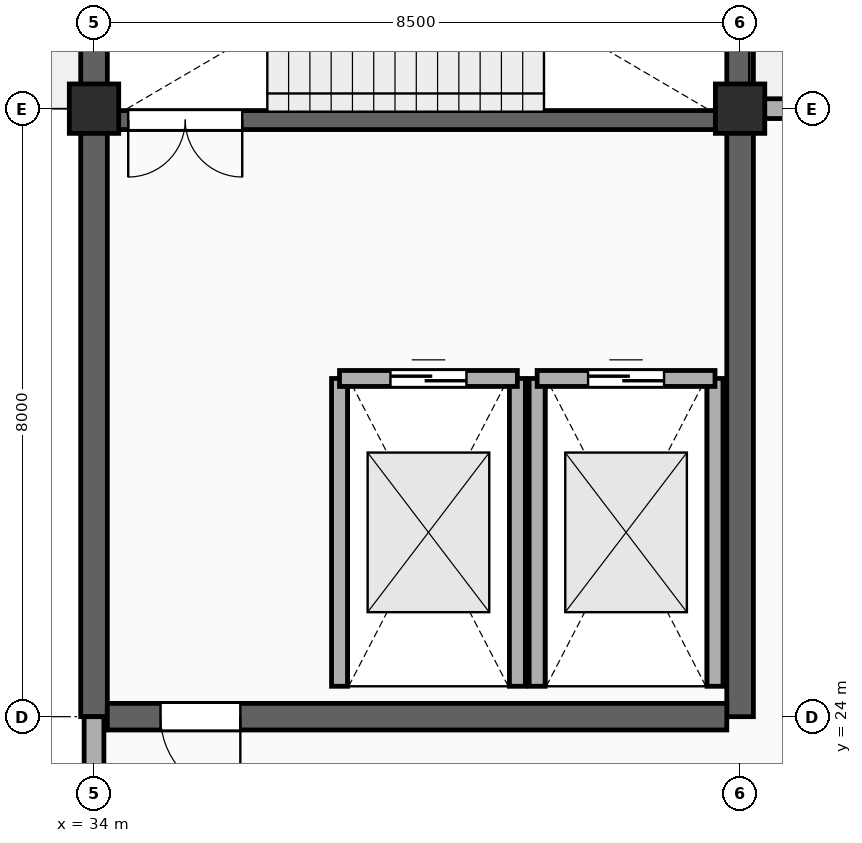
"""IFC4 building model, lengths in metres.
Left out: names, types, materials, properties, quantities, classifications, styles, units other than length and angle.
Written with IfcOpenShell. Run it as: python <this file> out.ifc"""

import sys

from ifc_helpers import new_model, si_unit, direction, frame, frame_2d, origin, origin_2d, place, context, subcontext, project, spatial, rectangle, extrude, element, fill, save


model = new_model("IFC4")
c1 = context("Model", 3, precision=1e-05, world=origin(), true_north=direction((0.0, 1.0)))
c2 = subcontext(c1, "Body", "Model", "MODEL_VIEW")
j1 = project(units=[si_unit("LENGTHUNIT", "METRE"), si_unit("PLANEANGLEUNIT", "RADIAN")], contexts=[c1])
p1 = place(None, origin())
s1 = spatial("IfcSite", under=j1, at=p1, CompositionType="ELEMENT")
p2 = place(p1, origin())
s2 = spatial("IfcBuilding", under=s1, at=p2, CompositionType="ELEMENT")
p3 = place(p2, frame((0.0, 0.0, 19.8)))
s3 = spatial("IfcBuildingStorey", under=s2, at=p3, CompositionType="ELEMENT", Elevation=19.8)
for number, where, z_axis, x_axis in (
    (1, (34.0, 24.0, 0.0), (0.0, 0.0, 1.0), (0.0, 1.0, 0.0)),
    (2, (42.5, 24.0, 0.0), (0.0, 0.0, 1.0), (0.0, 1.0, 0.0)),
):
    element("IfcWall", number, at=place(p3, frame(where, z_axis=z_axis, x_axis=x_axis)), inside=s3, PredefinedType="SHEAR", context=c2, shape_type="SweptSolid", body=[
        extrude(rectangle(XDim=12.8, YDim=0.35, at=frame_2d((6.4, 0.0))), origin(), (0.0, 0.0, 1.0), 4.64),
    ])
p4 = place(p3, frame((34.175, 24.0, 0.0), z_axis=(0.0, 0.0, 1.0), x_axis=(1.0, 0.0, 0.0)))
e3 = element("IfcWall", 3, at=p4, inside=s3, PredefinedType="SHEAR", context=c2, shape_type="SweptSolid", body=[
    extrude(rectangle(XDim=8.15, YDim=0.35, at=frame_2d((4.075, 0.0))), origin(), (0.0, 0.0, 1.0), 4.64),
])
p5 = place(p4, frame((0.7, 0.0, 0.0)))
e4 = element("IfcOpeningElement", 4, at=p5, cuts=e3, PredefinedType="OPENING", context=c2, shape_type="SweptSolid", body=[
    extrude(rectangle(XDim=1.05, YDim=2.15, at=frame_2d((0.525, 1.075))), frame((0.0, 0.187, 0.0), z_axis=(0.0, -1.0, 0.0), x_axis=(1.0, 0.0, 0.0)), (0.0, 0.0, 1.0), 0.374),
])
p6 = place(p3, frame((34.25, 31.85, 0.0), z_axis=(0.0, 0.0, 1.0), x_axis=(1.0, 0.0, 0.0)))
e5 = element("IfcWall", 5, at=p6, inside=s3, PredefinedType="STANDARD", context=c2, shape_type="SweptSolid", body=[
    extrude(rectangle(XDim=8.0, YDim=0.25, at=frame_2d((4.0, 0.0))), origin(), (0.0, 0.0, 1.0), 4.64),
])
p7 = place(p6, frame((0.2, 0.0, 0.0)))
e6 = element("IfcOpeningElement", 6, at=p7, cuts=e5, PredefinedType="OPENING", context=c2, shape_type="SweptSolid", body=[
    extrude(rectangle(XDim=1.5, YDim=2.2, at=frame_2d((0.75, 1.1))), frame((0.0, 0.137, 0.0), z_axis=(0.0, -1.0, 0.0), x_axis=(1.0, 0.0, 0.0)), (0.0, 0.0, 1.0), 0.274),
])
for number, where, z_axis, x_axis in (
    (7, (37.23, 24.4, 0.0), (0.0, 0.0, 1.0), (0.0, 1.0, 0.0)),
    (8, (39.57, 24.4, 0.0), (0.0, 0.0, 1.0), (0.0, 1.0, 0.0)),
):
    element("IfcWall", number, at=place(p3, frame(where, z_axis=z_axis, x_axis=x_axis)), inside=s3, PredefinedType="PARTITIONING", context=c2, shape_type="SweptSolid", body=[
        extrude(rectangle(XDim=4.05, YDim=0.21, at=frame_2d((2.025, 0.0))), origin(), (0.0, 0.0, 1.0), 4.64),
    ])
p8 = place(p3, frame((37.23, 28.45, 0.0), z_axis=(0.0, 0.0, 1.0), x_axis=(1.0, 0.0, 0.0)))
e9 = element("IfcWall", 9, at=p8, inside=s3, PredefinedType="PARTITIONING", context=c2, shape_type="SweptSolid", body=[
    extrude(rectangle(XDim=2.34, YDim=0.21, at=frame_2d((1.17, 0.0))), origin(), (0.0, 0.0, 1.0), 4.64),
])
p9 = place(p8, frame((0.67, 0.0, 0.0)))
e10 = element("IfcOpeningElement", 10, at=p9, cuts=e9, PredefinedType="OPENING", context=c2, shape_type="SweptSolid", body=[
    extrude(rectangle(XDim=1.0, YDim=2.2, at=frame_2d((0.5, 1.1))), frame((0.0, 0.117, 0.0), z_axis=(0.0, -1.0, 0.0), x_axis=(1.0, 0.0, 0.0)), (0.0, 0.0, 1.0), 0.234),
])
for number, where, z_axis, x_axis in (
    (11, (39.83, 24.4, 0.0), (0.0, 0.0, 1.0), (0.0, 1.0, 0.0)),
    (12, (42.17, 24.4, 0.0), (0.0, 0.0, 1.0), (0.0, 1.0, 0.0)),
):
    element("IfcWall", number, at=place(p3, frame(where, z_axis=z_axis, x_axis=x_axis)), inside=s3, PredefinedType="PARTITIONING", context=c2, shape_type="SweptSolid", body=[
        extrude(rectangle(XDim=4.05, YDim=0.21, at=frame_2d((2.025, 0.0))), origin(), (0.0, 0.0, 1.0), 4.64),
    ])
p10 = place(p3, frame((39.83, 28.45, 0.0), z_axis=(0.0, 0.0, 1.0), x_axis=(1.0, 0.0, 0.0)))
e13 = element("IfcWall", 13, at=p10, inside=s3, PredefinedType="PARTITIONING", context=c2, shape_type="SweptSolid", body=[
    extrude(rectangle(XDim=2.34, YDim=0.21, at=frame_2d((1.17, 0.0))), origin(), (0.0, 0.0, 1.0), 4.64),
])
p11 = place(p10, frame((0.67, 0.0, 0.0)))
e14 = element("IfcOpeningElement", 14, at=p11, cuts=e13, PredefinedType="OPENING", context=c2, shape_type="SweptSolid", body=[
    extrude(rectangle(XDim=1.0, YDim=2.2, at=frame_2d((0.5, 1.1))), frame((0.0, 0.117, 0.0), z_axis=(0.0, -1.0, 0.0), x_axis=(1.0, 0.0, 0.0)), (0.0, 0.0, 1.0), 0.234),
])
for number, where, z_axis, x_axis in (
    (15, (34.0, 32.0, 0.0), (0.0, 0.0, 1.0), (1.0, 0.0, 0.0)),
    (16, (42.5, 32.0, 0.0), (0.0, 0.0, 1.0), (1.0, 0.0, 0.0)),
):
    element("IfcColumn", number, at=place(p3, frame(where, z_axis=z_axis, x_axis=x_axis)), inside=s3, PredefinedType="COLUMN", context=c2, shape_type="SweptSolid", body=[
        extrude(rectangle(XDim=0.65, YDim=0.65, at=origin_2d()), origin(), (0.0, 0.0, 1.0), 4.52),
    ])
p12 = place(p3, frame((34.0, 0.0, 0.0), z_axis=(0.0, 0.0, 1.0), x_axis=(0.0, 1.0, 0.0)))
e17 = element("IfcWall", 17, at=p12, inside=s3, PredefinedType="STANDARD", context=c2, shape_type="SweptSolid", body=[
    extrude(rectangle(XDim=24.0, YDim=0.26, at=frame_2d((12.0, 0.0))), origin(), (0.0, 0.0, 1.0), 3.66),
])
p13 = place(p12, frame((3.25, 0.0, 0.9)))
e18 = element("IfcOpeningElement", 18, at=p13, cuts=e17, PredefinedType="OPENING", context=c2, shape_type="SweptSolid", body=[
    extrude(rectangle(XDim=1.5, YDim=1.8, at=frame_2d((0.75, 0.9))), frame((0.0, 0.142, 0.0), z_axis=(0.0, -1.0, 0.0), x_axis=(1.0, 0.0, 0.0)), (0.0, 0.0, 1.0), 0.284),
])
p14 = place(p12, frame((11.25, 0.0, 0.9)))
e19 = element("IfcOpeningElement", 19, at=p14, cuts=e17, PredefinedType="OPENING", context=c2, shape_type="SweptSolid", body=[
    extrude(rectangle(XDim=1.5, YDim=1.8, at=frame_2d((0.75, 0.9))), frame((0.0, 0.142, 0.0), z_axis=(0.0, -1.0, 0.0), x_axis=(1.0, 0.0, 0.0)), (0.0, 0.0, 1.0), 0.284),
])
p15 = place(p3, frame((42.5, 32.0, 0.0), z_axis=(0.0, 0.0, 1.0), x_axis=(1.0, 0.0, 0.0)))
e20 = element("IfcWall", 20, at=p15, inside=s3, PredefinedType="STANDARD", context=c2, shape_type="SweptSolid", body=[
    extrude(rectangle(XDim=25.5, YDim=0.26, at=frame_2d((12.75, 0.0))), origin(), (0.0, 0.0, 1.0), 3.914),
])
p16 = place(p15, frame((14.0, 0.0, 0.0)))
e21 = element("IfcOpeningElement", 21, at=p16, cuts=e20, PredefinedType="OPENING", context=c2, shape_type="SweptSolid", body=[
    extrude(rectangle(XDim=1.6, YDim=2.3, at=frame_2d((0.8, 1.15))), frame((0.0, 0.142, 0.0), z_axis=(0.0, -1.0, 0.0), x_axis=(1.0, 0.0, 0.0)), (0.0, 0.0, 1.0), 0.284),
])
p17 = place(p15, frame((3.35, 0.0, 0.9)))
e22 = element("IfcOpeningElement", 22, at=p17, cuts=e20, PredefinedType="OPENING", context=c2, shape_type="SweptSolid", body=[
    extrude(rectangle(XDim=1.8, YDim=1.8, at=frame_2d((0.9, 0.9))), frame((0.0, 0.142, 0.0), z_axis=(0.0, -1.0, 0.0), x_axis=(1.0, 0.0, 0.0)), (0.0, 0.0, 1.0), 0.284),
])
p18 = place(p15, frame((11.85, 0.0, 0.9)))
e23 = element("IfcOpeningElement", 23, at=p18, cuts=e20, PredefinedType="OPENING", context=c2, shape_type="SweptSolid", body=[
    extrude(rectangle(XDim=1.8, YDim=1.8, at=frame_2d((0.9, 0.9))), frame((0.0, 0.142, 0.0), z_axis=(0.0, -1.0, 0.0), x_axis=(1.0, 0.0, 0.0)), (0.0, 0.0, 1.0), 0.284),
])
p19 = place(p15, frame((20.35, 0.0, 0.9)))
e24 = element("IfcOpeningElement", 24, at=p19, cuts=e20, PredefinedType="OPENING", context=c2, shape_type="SweptSolid", body=[
    extrude(rectangle(XDim=1.8, YDim=1.8, at=frame_2d((0.9, 0.9))), frame((0.0, 0.142, 0.0), z_axis=(0.0, -1.0, 0.0), x_axis=(1.0, 0.0, 0.0)), (0.0, 0.0, 1.0), 0.284),
])
p20 = place(p7, frame((1.5, 0.0, 0.0), z_axis=(0.0, 0.0, 1.0), x_axis=(-1.0, 0.0, 0.0)))
e25 = element("IfcDoor", 25, at=p20, inside=s3, OperationType="DOUBLE_DOOR_SINGLE_SWING", PredefinedType="DOOR", context=c2, shape_type="SweptSolid", body=[
    extrude(rectangle(XDim=1.5, YDim=2.2, at=frame_2d((0.75, 1.1))), frame((0.0, 0.025, 0.0), z_axis=(0.0, -1.0, 0.0), x_axis=(1.0, 0.0, 0.0)), (0.0, 0.0, 1.0), 0.05),
])
fill(e6, e25)
p21 = place(p9, origin())
e26 = element("IfcDoor", 26, at=p21, inside=s3, OperationType="DOUBLE_DOOR_SLIDING", PredefinedType="DOOR", context=c2, shape_type="SweptSolid", body=[
    extrude(rectangle(XDim=1.0, YDim=2.2, at=frame_2d((0.5, 1.1))), frame((0.0, 0.025, 0.0), z_axis=(0.0, -1.0, 0.0), x_axis=(1.0, 0.0, 0.0)), (0.0, 0.0, 1.0), 0.05),
])
fill(e10, e26)
p22 = place(p11, origin())
e27 = element("IfcDoor", 27, at=p22, inside=s3, OperationType="DOUBLE_DOOR_SLIDING", PredefinedType="DOOR", context=c2, shape_type="SweptSolid", body=[
    extrude(rectangle(XDim=1.0, YDim=2.2, at=frame_2d((0.5, 1.1))), frame((0.0, 0.025, 0.0), z_axis=(0.0, -1.0, 0.0), x_axis=(1.0, 0.0, 0.0)), (0.0, 0.0, 1.0), 0.05),
])
fill(e14, e27)
p23 = place(p5, frame((1.05, 0.0, 0.0), z_axis=(0.0, 0.0, 1.0), x_axis=(-1.0, 0.0, 0.0)))
e28 = element("IfcDoor", 28, at=p23, inside=s3, OperationType="SINGLE_SWING_RIGHT", PredefinedType="DOOR", context=c2, shape_type="SweptSolid", body=[
    extrude(rectangle(XDim=1.05, YDim=2.15, at=frame_2d((0.525, 1.075))), frame((0.0, 0.025, 0.0), z_axis=(0.0, -1.0, 0.0), x_axis=(1.0, 0.0, 0.0)), (0.0, 0.0, 1.0), 0.05),
])
fill(e4, e28)
save(model, sys.argv[1])
